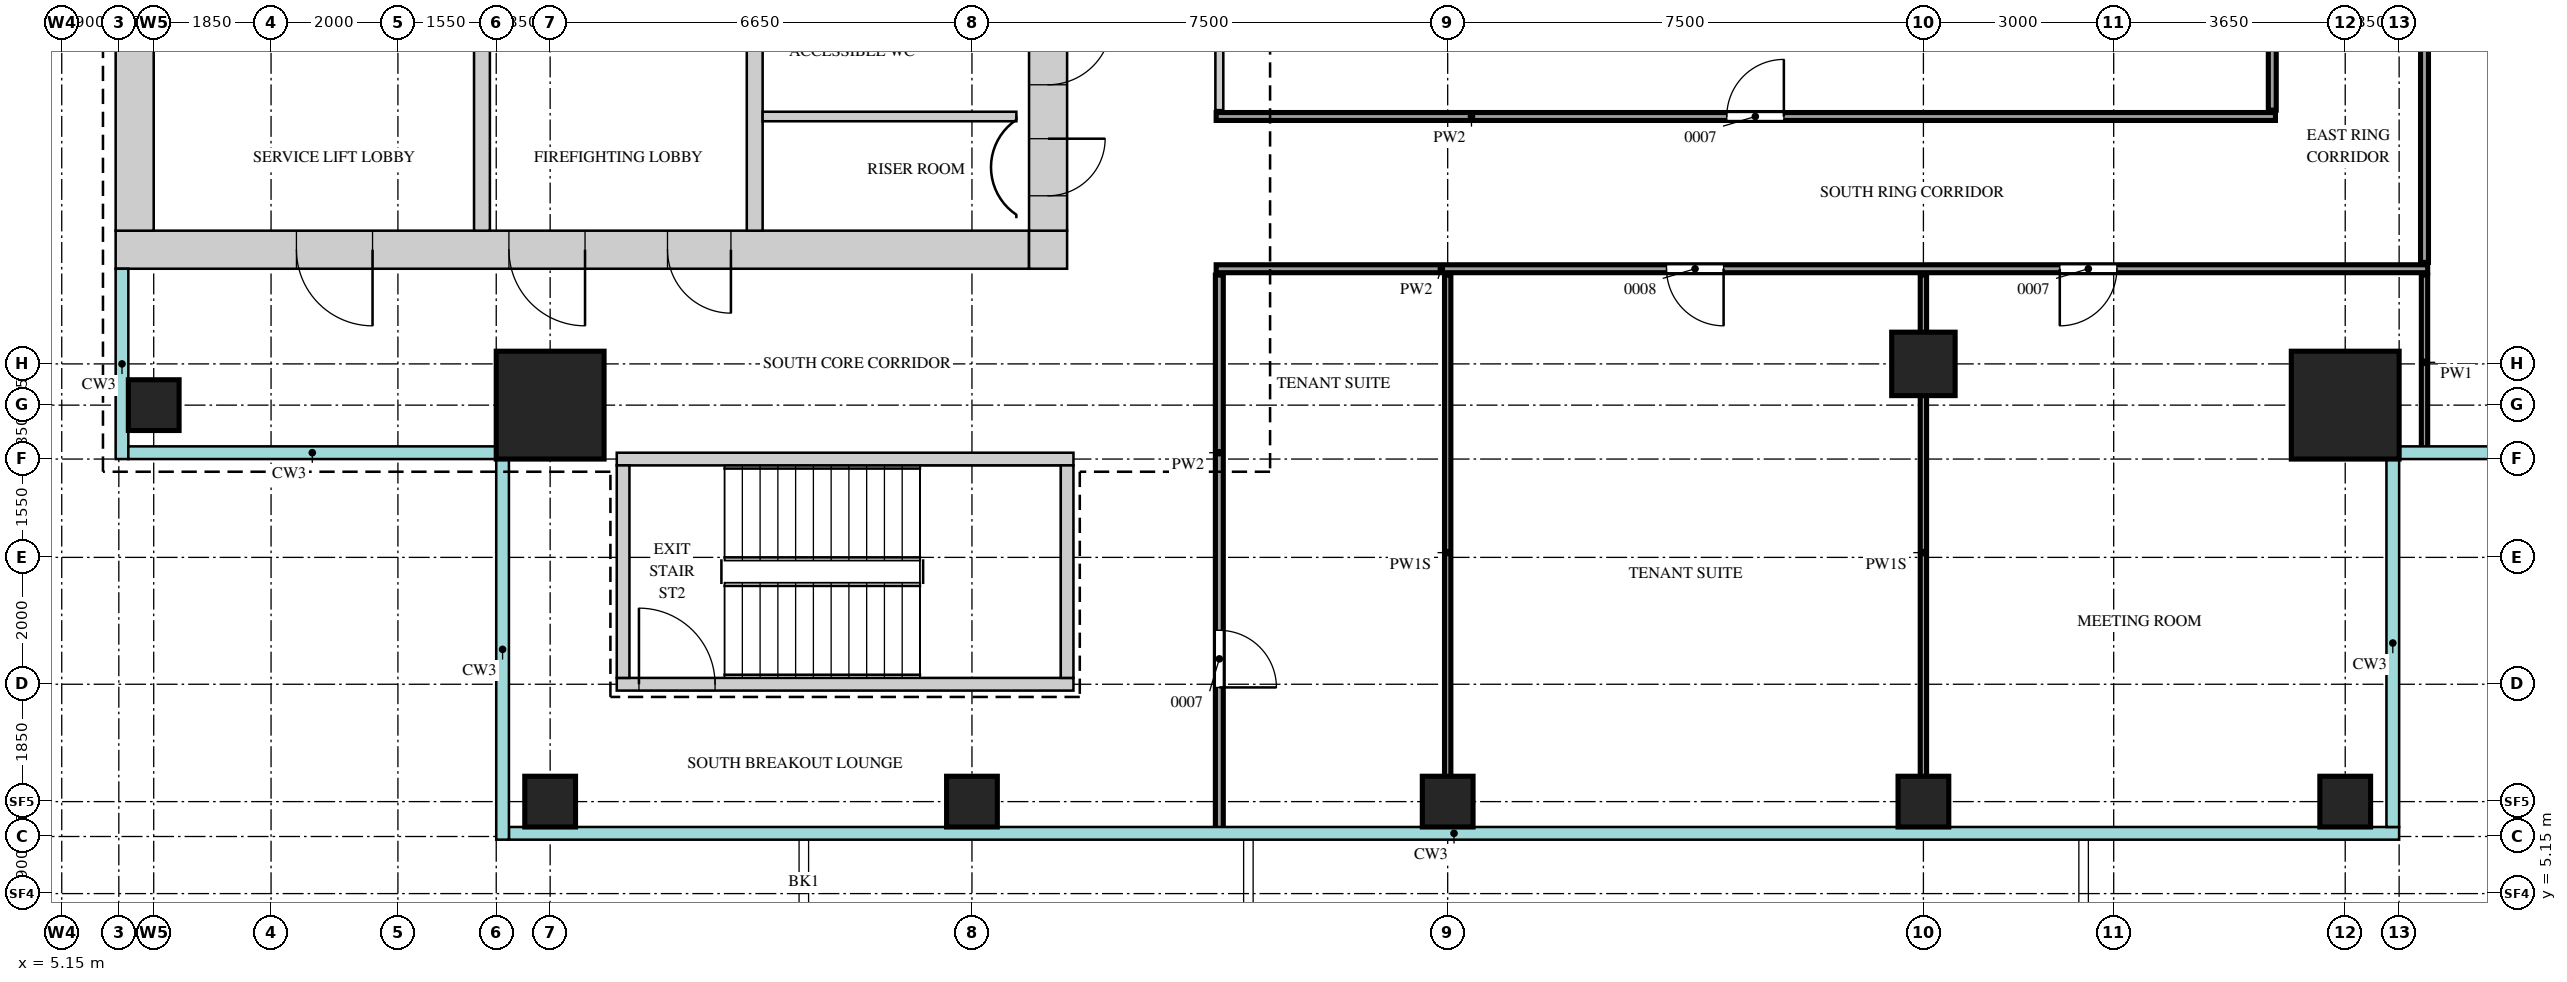
"""IFC4 building model, lengths in metres.
Left out: names, types, materials, properties, quantities, classifications, styles, units other than length and angle.
Written with IfcOpenShell. Run it as: python <this file> out.ifc"""

import sys

from ifc_helpers import new_model, si_unit, direction, frame, frame_2d, origin, origin_2d, place, context, subcontext, project, spatial, rectangle, extrude, source, transform, mapped, element, fill, save


model = new_model("IFC4")
c1 = context("Model", 3, precision=1e-05, world=origin(), true_north=direction((0.0, 1.0)))
c2 = subcontext(c1, "Body", "Model", "MODEL_VIEW")
j1 = project(units=[si_unit("LENGTHUNIT", "METRE"), si_unit("PLANEANGLEUNIT", "RADIAN")], contexts=[c1])
p1 = place(None, origin())
s1 = spatial("IfcSite", under=j1, at=p1, CompositionType="ELEMENT")
p2 = place(p1, origin())
s2 = spatial("IfcBuilding", under=s1, at=p2, CompositionType="ELEMENT")
p3 = place(p2, frame((0.0, 0.0, 290.2)))
s3 = spatial("IfcBuildingStorey", under=s2, at=p3, CompositionType="ELEMENT", Elevation=290.2)
m1 = source(origin(), c2, "Body", "SweptSolid", [
    extrude(rectangle(XDim=14.4, YDim=0.6, at=frame_2d((7.2, 0.0))), origin(), (0.0, 0.0, 1.0), 3.75),
])
p4 = place(p3, frame((6.0, 15.3, 0.0), z_axis=(0.0, 0.0, 1.0), x_axis=(1.0, 0.0, 0.0)))
e1 = element("IfcWall", 1, at=p4, inside=s3, PredefinedType="SHEAR", context=c2, shape_type="MappedRepresentation", body=[
    mapped(m1, transform((0.0, 0.0, 0.0))),
])
m2 = source(origin(), c2, "Body", "SweptSolid", [
    extrude(rectangle(XDim=1.2, YDim=2.1, at=frame_2d((0.6, 1.05))), frame((0.0, 0.31, 0.0), z_axis=(0.0, -1.0, 0.0), x_axis=(1.0, 0.0, 0.0)), (0.0, 0.0, 1.0), 0.62),
])
p5 = place(p4, frame((6.2, 0.0, 0.0)))
e2 = element("IfcOpeningElement", 2, at=p5, cuts=e1, PredefinedType="OPENING", context=c2, shape_type="MappedRepresentation", body=[
    mapped(m2, transform((0.0, 0.0, 0.0))),
])
p6 = place(p4, frame((2.85, 0.0, 0.0)))
e3 = element("IfcOpeningElement", 3, at=p6, cuts=e1, PredefinedType="OPENING", context=c2, shape_type="MappedRepresentation", body=[
    mapped(m2, transform((0.0, 0.0, 0.0))),
])
m3 = source(origin(), c2, "Body", "SweptSolid", [
    extrude(rectangle(XDim=1.0, YDim=2.1, at=frame_2d((0.5, 1.05))), frame((0.0, 0.31, 0.0), z_axis=(0.0, -1.0, 0.0), x_axis=(1.0, 0.0, 0.0)), (0.0, 0.0, 1.0), 0.62),
])
p7 = place(p4, frame((8.7, 0.0, 0.0)))
e4 = element("IfcOpeningElement", 4, at=p7, cuts=e1, PredefinedType="OPENING", context=c2, shape_type="MappedRepresentation", body=[
    mapped(m3, transform((0.0, 0.0, 0.0))),
])
m4 = source(origin(), c2, "Body", "SweptSolid", [
    extrude(rectangle(XDim=0.6, YDim=0.6, at=frame_2d((0.3, 0.0))), origin(), (0.0, 0.0, 1.0), 3.75),
])
p8 = place(p3, frame((20.4, 15.3, 0.0), z_axis=(0.0, 0.0, 1.0), x_axis=(1.0, 0.0, 0.0)))
e5 = element("IfcWall", 5, at=p8, inside=s3, PredefinedType="SHEAR", context=c2, shape_type="MappedRepresentation", body=[
    mapped(m4, transform((0.0, 0.0, 0.0))),
])
m5 = source(origin(), c2, "Body", "SweptSolid", [
    extrude(rectangle(XDim=22.8, YDim=0.6, at=frame_2d((11.4, 0.0))), origin(), (0.0, 0.0, 1.0), 3.75),
])
p9 = place(p3, frame((20.7, 15.6, 0.0), z_axis=(0.0, 0.0, 1.0), x_axis=(0.0, 1.0, 0.0)))
e6 = element("IfcWall", 6, at=p9, inside=s3, PredefinedType="SHEAR", context=c2, shape_type="MappedRepresentation", body=[
    mapped(m5, transform((0.0, 0.0, 0.0))),
])
m6 = source(origin(), c2, "Body", "SweptSolid", [
    extrude(rectangle(XDim=1.8, YDim=2.1, at=frame_2d((0.9, 1.05))), frame((0.0, 0.31, 0.0), z_axis=(0.0, -1.0, 0.0), x_axis=(1.0, 0.0, 0.0)), (0.0, 0.0, 1.0), 0.62),
])
p10 = place(p9, frame((10.9, 0.0, 0.0)))
e7 = element("IfcOpeningElement", 7, at=p10, cuts=e6, PredefinedType="OPENING", context=c2, shape_type="MappedRepresentation", body=[
    mapped(m6, transform((0.0, 0.0, 0.0))),
])
m7 = source(origin(), c2, "Body", "SweptSolid", [
    extrude(rectangle(XDim=0.9, YDim=2.1, at=frame_2d((0.45, 1.05))), frame((0.0, 0.31, 0.0), z_axis=(0.0, -1.0, 0.0), x_axis=(1.0, 0.0, 0.0)), (0.0, 0.0, 1.0), 0.62),
])
p11 = place(p9, frame((0.55, 0.0, 0.0)))
e8 = element("IfcOpeningElement", 8, at=p11, cuts=e6, PredefinedType="OPENING", context=c2, shape_type="MappedRepresentation", body=[
    mapped(m7, transform((0.0, 0.0, 0.0))),
])
p12 = place(p9, frame((2.3, 0.0, 0.0)))
e9 = element("IfcOpeningElement", 9, at=p12, cuts=e6, PredefinedType="OPENING", context=c2, shape_type="MappedRepresentation", body=[
    mapped(m3, transform((0.0, 0.0, 0.0))),
])
p13 = place(p9, frame((5.1, 0.0, 0.0)))
e10 = element("IfcOpeningElement", 10, at=p13, cuts=e6, PredefinedType="OPENING", context=c2, shape_type="MappedRepresentation", body=[
    mapped(m7, transform((0.0, 0.0, 0.0))),
])
p14 = place(p3, frame((6.3, 15.6, 0.0), z_axis=(0.0, 0.0, 1.0), x_axis=(0.0, 1.0, 0.0)))
e11 = element("IfcWall", 11, at=p14, inside=s3, PredefinedType="SHEAR", context=c2, shape_type="MappedRepresentation", body=[
    mapped(m5, transform((0.0, 0.0, 0.0))),
])
m8 = source(origin(), c2, "Body", "SweptSolid", [
    extrude(rectangle(XDim=7.2, YDim=0.2, at=frame_2d((3.6, 0.0))), origin(), (0.0, 0.0, 1.0), 3.75),
])
p15 = place(p3, frame((13.9, 12.0, 0.0), z_axis=(0.0, 0.0, 1.0), x_axis=(1.0, 0.0, 0.0)))
e12 = element("IfcWall", 12, at=p15, inside=s3, PredefinedType="SHEAR", context=c2, shape_type="MappedRepresentation", body=[
    mapped(m8, transform((0.0, 0.0, 0.0))),
])
p16 = place(p3, frame((13.9, 8.45, 0.0), z_axis=(0.0, 0.0, 1.0), x_axis=(1.0, 0.0, 0.0)))
e13 = element("IfcWall", 13, at=p16, inside=s3, PredefinedType="SHEAR", context=c2, shape_type="MappedRepresentation", body=[
    mapped(m8, transform((0.0, 0.0, 0.0))),
])
m9 = source(origin(), c2, "Body", "SweptSolid", [
    extrude(rectangle(XDim=1.2, YDim=2.1, at=frame_2d((0.6, 1.05))), frame((0.0, 0.11, 0.0), z_axis=(0.0, -1.0, 0.0), x_axis=(1.0, 0.0, 0.0)), (0.0, 0.0, 1.0), 0.22),
])
p17 = place(p16, frame((0.35, 0.0, 0.0)))
e14 = element("IfcOpeningElement", 14, at=p17, cuts=e13, PredefinedType="OPENING", context=c2, shape_type="MappedRepresentation", body=[
    mapped(m9, transform((0.0, 0.0, 0.0))),
])
m10 = source(origin(), c2, "Body", "SweptSolid", [
    extrude(rectangle(XDim=3.35, YDim=0.2, at=frame_2d((1.675, 0.0))), origin(), (0.0, 0.0, 1.0), 3.75),
])
for number, where, z_axis, x_axis in (
    (15, (21.0, 8.55, 0.0), (0.0, 0.0, 1.0), (0.0, 1.0, 0.0)),
    (16, (14.0, 8.55, 0.0), (0.0, 0.0, 1.0), (0.0, 1.0, 0.0)),
):
    element("IfcWall", number, at=place(p3, frame(where, z_axis=z_axis, x_axis=x_axis)), inside=s3, PredefinedType="SHEAR", context=c2, shape_type="MappedRepresentation", body=[
        mapped(m10, transform((0.0, 0.0, 0.0))),
    ])
m11 = source(origin(), c2, "Body", "SweptSolid", [
    extrude(rectangle(XDim=3.6, YDim=0.25, at=frame_2d((1.8, 0.0))), origin(), (0.0, 0.0, 1.0), 3.75),
])
for number, where, z_axis, x_axis in (
    (17, (16.075, 15.6, 0.0), (0.0, 0.0, 1.0), (0.0, 1.0, 0.0)),
    (18, (11.775, 15.6, 0.0), (0.0, 0.0, 1.0), (0.0, 1.0, 0.0)),
):
    element("IfcWall", number, at=place(p3, frame(where, z_axis=z_axis, x_axis=x_axis)), inside=s3, PredefinedType="STANDARD", context=c2, shape_type="MappedRepresentation", body=[
        mapped(m11, transform((0.0, 0.0, 0.0))),
    ])
m12 = source(origin(), c2, "Body", "SweptSolid", [
    extrude(rectangle(XDim=1.7, YDim=1.7, at=origin_2d()), origin(), (0.0, 0.0, 1.0), 3.75),
])
for number, where, z_axis, x_axis in (
    (19, (41.15, 12.85, 0.0), (0.0, 0.0, 1.0), (1.0, 0.0, 0.0)),
    (20, (12.85, 12.85, 0.0), (0.0, 0.0, 1.0), (1.0, 0.0, 0.0)),
):
    element("IfcColumn", number, at=place(p3, frame(where, z_axis=z_axis, x_axis=x_axis)), inside=s3, PredefinedType="COLUMN", context=c2, shape_type="MappedRepresentation", body=[
        mapped(m12, transform((0.0, 0.0, 0.0))),
    ])
m13 = source(origin(), c2, "Body", "SweptSolid", [
    extrude(rectangle(XDim=0.8, YDim=0.8, at=origin_2d()), origin(), (0.0, 0.0, 1.0), 3.75),
])
for number, where, z_axis, x_axis in (
    (21, (12.85, 6.6, 0.0), (0.0, 0.0, 1.0), (1.0, 0.0, 0.0)),
    (22, (19.5, 6.6, 0.0), (0.0, 0.0, 1.0), (1.0, 0.0, 0.0)),
    (23, (27.0, 6.6, 0.0), (0.0, 0.0, 1.0), (1.0, 0.0, 0.0)),
    (24, (34.5, 6.6, 0.0), (0.0, 0.0, 1.0), (1.0, 0.0, 0.0)),
    (25, (41.15, 6.6, 0.0), (0.0, 0.0, 1.0), (1.0, 0.0, 0.0)),
    (26, (6.6, 12.85, 0.0), (0.0, 0.0, 1.0), (1.0, 0.0, 0.0)),
):
    element("IfcColumn", number, at=place(p3, frame(where, z_axis=z_axis, x_axis=x_axis)), inside=s3, PredefinedType="COLUMN", context=c2, shape_type="MappedRepresentation", body=[
        mapped(m13, transform((0.0, 0.0, 0.0))),
    ])
m14 = source(origin(), c2, "Body", "SweptSolid", [
    extrude(rectangle(XDim=1.0, YDim=1.0, at=origin_2d()), origin(), (0.0, 0.0, 1.0), 3.75),
])
p18 = place(p3, frame((34.5, 13.5, 0.0), z_axis=(0.0, 0.0, 1.0), x_axis=(1.0, 0.0, 0.0)))
e27 = element("IfcColumn", 27, at=p18, inside=s3, PredefinedType="COLUMN", context=c2, shape_type="MappedRepresentation", body=[
    mapped(m14, transform((0.0, 0.0, 0.0))),
])
m15 = source(origin(), c2, "Body", "SweptSolid", [
    extrude(rectangle(XDim=8.75, YDim=0.125, at=frame_2d((4.375, 0.0))), origin(), (0.0, 0.0, 1.0), 3.8),
])
p19 = place(p3, frame((23.4, 6.15, 0.0), z_axis=(0.0, 0.0, 1.0), x_axis=(0.0, 1.0, 0.0)))
e28 = element("IfcWall", 28, at=p19, inside=s3, PredefinedType="PARTITIONING", context=c2, shape_type="MappedRepresentation", body=[
    mapped(m15, transform((0.0, 0.0, 0.0))),
])
m16 = source(origin(), c2, "Body", "SweptSolid", [
    extrude(rectangle(XDim=0.9, YDim=2.1, at=frame_2d((0.45, 1.05))), frame((0.0, 0.073, 0.0), z_axis=(0.0, -1.0, 0.0), x_axis=(1.0, 0.0, 0.0)), (0.0, 0.0, 1.0), 0.145),
])
p20 = place(p19, frame((2.25, 0.0, 0.0)))
e29 = element("IfcOpeningElement", 29, at=p20, cuts=e28, PredefinedType="OPENING", context=c2, shape_type="MappedRepresentation", body=[
    mapped(m16, transform((0.0, 0.0, 0.0))),
])
m17 = source(origin(), c2, "Body", "SweptSolid", [
    extrude(rectangle(XDim=8.75, YDim=0.1, at=frame_2d((4.375, 0.0))), origin(), (0.0, 0.0, 1.0), 3.35),
])
for number, where, z_axis, x_axis in (
    (30, (27.0, 6.15, 0.0), (0.0, 0.0, 1.0), (0.0, 1.0, 0.0)),
    (31, (34.5, 6.15, 0.0), (0.0, 0.0, 1.0), (0.0, 1.0, 0.0)),
):
    element("IfcWall", number, at=place(p3, frame(where, z_axis=z_axis, x_axis=x_axis)), inside=s3, PredefinedType="PARTITIONING", context=c2, shape_type="MappedRepresentation", body=[
        mapped(m17, transform((0.0, 0.0, 0.0))),
    ])
m18 = source(origin(), c2, "Body", "SweptSolid", [
    extrude(rectangle(XDim=2.75, YDim=0.1, at=frame_2d((1.375, 0.0))), origin(), (0.0, 0.0, 1.0), 3.8),
])
p21 = place(p3, frame((42.4, 12.15, 0.0), z_axis=(0.0, 0.0, 1.0), x_axis=(0.0, 1.0, 0.0)))
e32 = element("IfcWall", 32, at=p21, inside=s3, PredefinedType="PARTITIONING", context=c2, shape_type="MappedRepresentation", body=[
    mapped(m18, transform((0.0, 0.0, 0.0))),
])
m19 = source(origin(), c2, "Body", "SweptSolid", [
    extrude(rectangle(XDim=19.1, YDim=0.125, at=frame_2d((9.55, 0.0))), origin(), (0.0, 0.0, 1.0), 3.8),
])
p22 = place(p3, frame((23.35, 15.0, 0.0), z_axis=(0.0, 0.0, 1.0), x_axis=(1.0, 0.0, 0.0)))
e33 = element("IfcWall", 33, at=p22, inside=s3, PredefinedType="PARTITIONING", context=c2, shape_type="MappedRepresentation", body=[
    mapped(m19, transform((0.0, 0.0, 0.0))),
])
p23 = place(p22, frame((7.1, 0.0, 0.0)))
e34 = element("IfcOpeningElement", 34, at=p23, cuts=e33, PredefinedType="OPENING", context=c2, shape_type="MappedRepresentation", body=[
    mapped(m16, transform((0.0, 0.0, 0.0))),
])
p24 = place(p22, frame((13.3, 0.0, 0.0)))
e35 = element("IfcOpeningElement", 35, at=p24, cuts=e33, PredefinedType="OPENING", context=c2, shape_type="MappedRepresentation", body=[
    mapped(m16, transform((0.0, 0.0, 0.0))),
])
m20 = source(origin(), c2, "Body", "SweptSolid", [
    extrude(rectangle(XDim=23.8, YDim=0.125, at=frame_2d((11.9, 0.0))), origin(), (0.0, 0.0, 1.0), 3.8),
])
p25 = place(p3, frame((42.4, 15.1, 0.0), z_axis=(0.0, 0.0, 1.0), x_axis=(0.0, 1.0, 0.0)))
e36 = element("IfcWall", 36, at=p25, inside=s3, PredefinedType="PARTITIONING", context=c2, shape_type="MappedRepresentation", body=[
    mapped(m20, transform((0.0, 0.0, 0.0))),
])
p26 = place(p25, frame((5.3, 0.0, 0.0)))
e37 = element("IfcOpeningElement", 37, at=p26, cuts=e36, PredefinedType="OPENING", context=c2, shape_type="MappedRepresentation", body=[
    mapped(m16, transform((0.0, 0.0, 0.0))),
])
p27 = place(p25, frame((15.35, 0.0, 0.0)))
e38 = element("IfcOpeningElement", 38, at=p27, cuts=e36, PredefinedType="OPENING", context=c2, shape_type="MappedRepresentation", body=[
    mapped(m16, transform((0.0, 0.0, 0.0))),
])
p28 = place(p25, frame((21.05, 0.0, 0.0)))
e39 = element("IfcOpeningElement", 39, at=p28, cuts=e36, PredefinedType="OPENING", context=c2, shape_type="MappedRepresentation", body=[
    mapped(m16, transform((0.0, 0.0, 0.0))),
])
m21 = source(origin(), c2, "Body", "SweptSolid", [
    extrude(rectangle(XDim=4.0, YDim=0.15, at=frame_2d((2.0, 0.0))), origin(), (0.0, 0.0, 1.0), 3.8),
])
p29 = place(p3, frame((16.2, 17.4, 0.0), z_axis=(0.0, 0.0, 1.0), x_axis=(1.0, 0.0, 0.0)))
e40 = element("IfcWall", 40, at=p29, inside=s3, PredefinedType="PARTITIONING", context=c2, shape_type="MappedRepresentation", body=[
    mapped(m21, transform((0.0, 0.0, 0.0))),
])
m22 = source(origin(), c2, "Body", "SweptSolid", [
    extrude(rectangle(XDim=16.7, YDim=0.125, at=frame_2d((8.35, 0.0))), origin(), (0.0, 0.0, 1.0), 3.8),
])
p30 = place(p3, frame((23.35, 17.4, 0.0), z_axis=(0.0, 0.0, 1.0), x_axis=(1.0, 0.0, 0.0)))
e41 = element("IfcWall", 41, at=p30, inside=s3, PredefinedType="PARTITIONING", context=c2, shape_type="MappedRepresentation", body=[
    mapped(m22, transform((0.0, 0.0, 0.0))),
])
p31 = place(p30, frame((8.05, 0.0, 0.0)))
e42 = element("IfcOpeningElement", 42, at=p31, cuts=e41, PredefinedType="OPENING", context=c2, shape_type="MappedRepresentation", body=[
    mapped(m16, transform((0.0, 0.0, 0.0))),
])
m23 = source(origin(), c2, "Body", "SweptSolid", [
    extrude(rectangle(XDim=19.0, YDim=0.125, at=frame_2d((9.5, 0.0))), origin(), (0.0, 0.0, 1.0), 3.8),
])
p32 = place(p3, frame((23.4, 17.5, 0.0), z_axis=(0.0, 0.0, 1.0), x_axis=(0.0, 1.0, 0.0)))
e43 = element("IfcWall", 43, at=p32, inside=s3, PredefinedType="PARTITIONING", context=c2, shape_type="MappedRepresentation", body=[
    mapped(m23, transform((0.0, 0.0, 0.0))),
])
p33 = place(p32, frame((9.4, 0.0, 0.0)))
e44 = element("IfcOpeningElement", 44, at=p33, cuts=e43, PredefinedType="OPENING", context=c2, shape_type="MappedRepresentation", body=[
    mapped(m16, transform((0.0, 0.0, 0.0))),
])
p34 = place(p3, frame((40.0, 17.5, 0.0), z_axis=(0.0, 0.0, 1.0), x_axis=(0.0, 1.0, 0.0)))
e45 = element("IfcWall", 45, at=p34, inside=s3, PredefinedType="PARTITIONING", context=c2, shape_type="MappedRepresentation", body=[
    mapped(m23, transform((0.0, 0.0, 0.0))),
])
m24 = source(origin(), c2, "Body", "SweptSolid", [
    extrude(rectangle(XDim=0.9, YDim=2.1, at=frame_2d((0.45, 1.05))), frame((0.0, 0.25, 0.0), z_axis=(0.0, -1.0, 0.0), x_axis=(1.0, 0.0, 0.0)), (0.0, 0.0, 1.0), 0.5),
])
p35 = place(p11, origin())
e46 = element("IfcDoor", 46, at=p35, inside=s3, OperationType="SINGLE_SWING_RIGHT", PredefinedType="DOOR", context=c2, shape_type="MappedRepresentation", body=[
    mapped(m24, transform((0.0, 0.0, 0.0))),
])
fill(e8, e46)
m25 = source(origin(), c2, "Body", "SweptSolid", [
    extrude(rectangle(XDim=1.0, YDim=2.1, at=frame_2d((0.5, 1.05))), frame((0.0, 0.25, 0.0), z_axis=(0.0, -1.0, 0.0), x_axis=(1.0, 0.0, 0.0)), (0.0, 0.0, 1.0), 0.5),
])
p36 = place(p12, origin())
e47 = element("IfcDoor", 47, at=p36, inside=s3, OperationType="SINGLE_SWING_RIGHT", PredefinedType="DOOR", context=c2, shape_type="MappedRepresentation", body=[
    mapped(m25, transform((0.0, 0.0, 0.0))),
])
fill(e9, e47)
m26 = source(origin(), c2, "Body", "SweptSolid", [
    extrude(rectangle(XDim=1.2, YDim=2.1, at=frame_2d((0.6, 1.05))), frame((0.0, 0.25, 0.0), z_axis=(0.0, -1.0, 0.0), x_axis=(1.0, 0.0, 0.0)), (0.0, 0.0, 1.0), 0.5),
])
p37 = place(p5, origin())
e48 = element("IfcDoor", 48, at=p37, inside=s3, OperationType="SINGLE_SWING_RIGHT", PredefinedType="DOOR", context=c2, shape_type="MappedRepresentation", body=[
    mapped(m26, transform((0.0, 0.0, 0.0))),
])
fill(e2, e48)
p38 = place(p6, origin())
e49 = element("IfcDoor", 49, at=p38, inside=s3, OperationType="SINGLE_SWING_RIGHT", PredefinedType="DOOR", context=c2, shape_type="MappedRepresentation", body=[
    mapped(m26, transform((0.0, 0.0, 0.0))),
])
fill(e3, e49)
p39 = place(p7, origin())
e50 = element("IfcDoor", 50, at=p39, inside=s3, OperationType="SINGLE_SWING_RIGHT", PredefinedType="DOOR", context=c2, shape_type="MappedRepresentation", body=[
    mapped(m25, transform((0.0, 0.0, 0.0))),
])
fill(e4, e50)
m27 = source(origin(), c2, "Body", "SweptSolid", [
    extrude(rectangle(XDim=0.9, YDim=2.1, at=frame_2d((0.45, 1.05))), frame((0.0, 0.025, 0.0), z_axis=(0.0, -1.0, 0.0), x_axis=(1.0, 0.0, 0.0)), (0.0, 0.0, 1.0), 0.05),
])
p40 = place(p20, origin())
e51 = element("IfcDoor", 51, at=p40, inside=s3, OperationType="SINGLE_SWING_LEFT", PredefinedType="DOOR", context=c2, shape_type="MappedRepresentation", body=[
    mapped(m27, transform((0.0, 0.0, 0.0))),
])
fill(e29, e51)
p41 = place(p23, origin())
e52 = element("IfcDoor", 52, at=p41, inside=s3, OperationType="SINGLE_SWING_RIGHT", PredefinedType="DOOR", context=c2, shape_type="MappedRepresentation", body=[
    mapped(m27, transform((0.0, 0.0, 0.0))),
])
fill(e34, e52)
p42 = place(p24, origin())
e53 = element("IfcDoor", 53, at=p42, inside=s3, OperationType="SINGLE_SWING_LEFT", PredefinedType="DOOR", context=c2, shape_type="MappedRepresentation", body=[
    mapped(m27, transform((0.0, 0.0, 0.0))),
])
fill(e35, e53)
p43 = place(p31, origin())
e54 = element("IfcDoor", 54, at=p43, inside=s3, OperationType="SINGLE_SWING_LEFT", PredefinedType="DOOR", context=c2, shape_type="MappedRepresentation", body=[
    mapped(m27, transform((0.0, 0.0, 0.0))),
])
fill(e42, e54)
m28 = source(origin(), c2, "Body", "SweptSolid", [
    extrude(rectangle(XDim=1.2, YDim=2.1, at=frame_2d((0.6, 1.05))), frame((0.0, 0.025, 0.0), z_axis=(0.0, -1.0, 0.0), x_axis=(1.0, 0.0, 0.0)), (0.0, 0.0, 1.0), 0.05),
])
p44 = place(p17, origin())
e55 = element("IfcDoor", 55, at=p44, inside=s3, OperationType="SINGLE_SWING_RIGHT", PredefinedType="DOOR", context=c2, shape_type="MappedRepresentation", body=[
    mapped(m28, transform((0.0, 0.0, 0.0))),
])
fill(e14, e55)
save(model, sys.argv[1])
